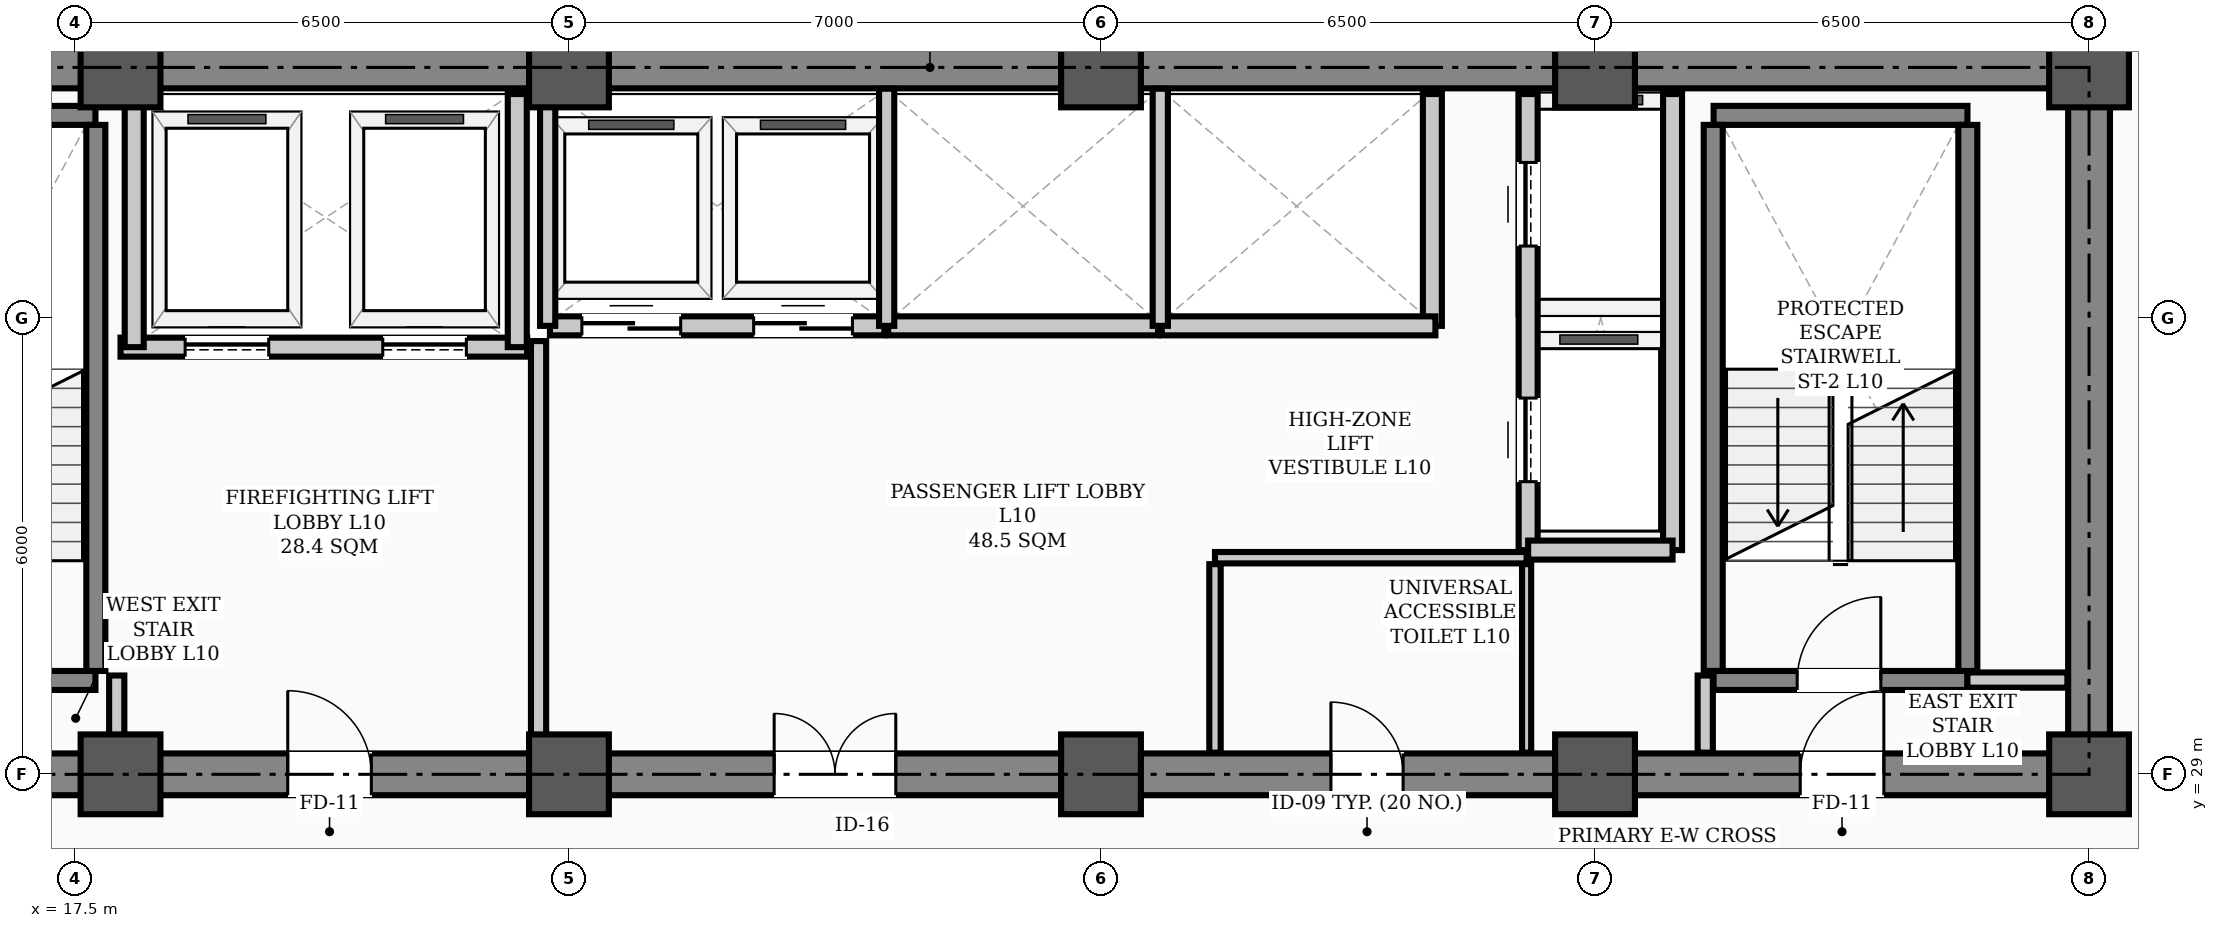
"""IFC4 building model, lengths in metres.
Left out: names, types, materials, properties, quantities, classifications, styles, units other than length and angle.
Written with IfcOpenShell. Run it as: python <this file> out.ifc"""

import sys

from ifc_helpers import new_model, si_unit, direction, frame, frame_2d, origin, origin_2d, place, context, subcontext, project, spatial, rectangle, hollow_rectangle, extrude, element, fill, save


model = new_model("IFC4")
c1 = context("Model", 3, precision=1e-05, world=origin(), true_north=direction((0.0, 1.0)))
c2 = subcontext(c1, "Body", "Model", "MODEL_VIEW")
j1 = project(units=[si_unit("LENGTHUNIT", "METRE"), si_unit("PLANEANGLEUNIT", "RADIAN")], contexts=[c1])
p1 = place(None, origin())
s1 = spatial("IfcSite", under=j1, at=p1, CompositionType="ELEMENT")
p2 = place(p1, origin())
s2 = spatial("IfcBuilding", under=s1, at=p2, CompositionType="ELEMENT")
p3 = place(p2, frame((0.0, 0.0, 42.1)))
s3 = spatial("IfcBuildingStorey", under=s2, at=p3, CompositionType="ELEMENT", Elevation=42.1)
for number, where, z_axis, x_axis in (
    (1, (18.1, 29.0, 0.0), (0.0, 0.0, 1.0), (1.0, 0.0, 0.0)),
    (2, (18.1, 38.3, 0.0), (0.0, 0.0, 1.0), (1.0, 0.0, 0.0)),
    (3, (24.0, 29.0, 0.0), (0.0, 0.0, 1.0), (1.0, 0.0, 0.0)),
    (4, (24.0, 38.3, 0.0), (0.0, 0.0, 1.0), (1.0, 0.0, 0.0)),
    (5, (31.0, 29.0, 0.0), (0.0, 0.0, 1.0), (1.0, 0.0, 0.0)),
    (6, (31.0, 38.3, 0.0), (0.0, 0.0, 1.0), (1.0, 0.0, 0.0)),
    (7, (37.5, 29.0, 0.0), (0.0, 0.0, 1.0), (1.0, 0.0, 0.0)),
    (8, (37.5, 38.3, 0.0), (0.0, 0.0, 1.0), (1.0, 0.0, 0.0)),
    (9, (44.0, 29.0, 0.0), (0.0, 0.0, 1.0), (1.0, 0.0, 0.0)),
    (10, (44.0, 38.3, 0.0), (0.0, 0.0, 1.0), (1.0, 0.0, 0.0)),
):
    element("IfcColumn", number, at=place(p3, frame(where, z_axis=z_axis, x_axis=x_axis)), inside=s3, PredefinedType="COLUMN", context=c2, shape_type="SweptSolid", body=[
        extrude(hollow_rectangle(XDim=1.05, YDim=1.05, WallThickness=0.038, InnerFilletRadius=0.019, OuterFilletRadius=0.057, at=origin_2d()), origin(), (0.0, 0.0, 1.0), 3.9),
    ])
p4 = place(p3, frame((13.5, 29.0, 0.0), z_axis=(0.0, 0.0, 1.0), x_axis=(1.0, 0.0, 0.0)))
e11 = element("IfcWall", 11, at=p4, inside=s3, PredefinedType="SHEAR", context=c2, shape_type="SweptSolid", body=[
    extrude(rectangle(XDim=30.5, YDim=0.55, at=frame_2d((15.25, 0.0))), origin(), (0.0, 0.0, 1.0), 3.72),
])
p5 = place(p4, frame((1.75, 0.0, 0.0)))
e12 = element("IfcOpeningElement", 12, at=p5, cuts=e11, PredefinedType="OPENING", context=c2, shape_type="SweptSolid", body=[
    extrude(rectangle(XDim=1.1, YDim=2.08, at=frame_2d((0.55, 1.04))), frame((0.0, 0.285, 0.0), z_axis=(0.0, -1.0, 0.0), x_axis=(1.0, 0.0, 0.0)), (0.0, 0.0, 1.0), 0.57),
])
p6 = place(p4, frame((26.7, 0.0, 0.0)))
e13 = element("IfcOpeningElement", 13, at=p6, cuts=e11, PredefinedType="OPENING", context=c2, shape_type="SweptSolid", body=[
    extrude(rectangle(XDim=1.1, YDim=2.08, at=frame_2d((0.55, 1.04))), frame((0.0, 0.285, 0.0), z_axis=(0.0, -1.0, 0.0), x_axis=(1.0, 0.0, 0.0)), (0.0, 0.0, 1.0), 0.57),
])
p7 = place(p4, frame((6.8, 0.0, 0.0)))
e14 = element("IfcOpeningElement", 14, at=p7, cuts=e11, PredefinedType="OPENING", context=c2, shape_type="SweptSolid", body=[
    extrude(rectangle(XDim=1.1, YDim=2.08, at=frame_2d((0.55, 1.04))), frame((0.0, 0.285, 0.0), z_axis=(0.0, -1.0, 0.0), x_axis=(1.0, 0.0, 0.0)), (0.0, 0.0, 1.0), 0.57),
])
p8 = place(p4, frame((13.2, 0.0, 0.0)))
e15 = element("IfcOpeningElement", 15, at=p8, cuts=e11, PredefinedType="OPENING", context=c2, shape_type="SweptSolid", body=[
    extrude(rectangle(XDim=1.6, YDim=2.08, at=frame_2d((0.8, 1.04))), frame((0.0, 0.285, 0.0), z_axis=(0.0, -1.0, 0.0), x_axis=(1.0, 0.0, 0.0)), (0.0, 0.0, 1.0), 0.57),
])
p9 = place(p4, frame((20.525, 0.0, 0.0)))
e16 = element("IfcOpeningElement", 16, at=p9, cuts=e11, PredefinedType="OPENING", context=c2, shape_type="SweptSolid", body=[
    extrude(rectangle(XDim=0.95, YDim=2.08, at=frame_2d((0.475, 1.04))), frame((0.0, 0.285, 0.0), z_axis=(0.0, -1.0, 0.0), x_axis=(1.0, 0.0, 0.0)), (0.0, 0.0, 1.0), 0.57),
])
p10 = place(p3, frame((13.5, 38.3, 0.0), z_axis=(0.0, 0.0, 1.0), x_axis=(1.0, 0.0, 0.0)))
e17 = element("IfcWall", 17, at=p10, inside=s3, PredefinedType="SHEAR", context=c2, shape_type="SweptSolid", body=[
    extrude(rectangle(XDim=30.5, YDim=0.55, at=frame_2d((15.25, 0.0))), origin(), (0.0, 0.0, 1.0), 3.72),
])
p11 = place(p3, frame((44.0, 29.35, 0.0), z_axis=(0.0, 0.0, 1.0), x_axis=(0.0, 1.0, 0.0)))
e18 = element("IfcWall", 18, at=p11, inside=s3, PredefinedType="SHEAR", context=c2, shape_type="SweptSolid", body=[
    extrude(rectangle(XDim=8.6, YDim=0.55, at=frame_2d((4.3, 0.0))), origin(), (0.0, 0.0, 1.0), 3.72),
])
p12 = place(p3, frame((14.43, 30.235, 0.0), z_axis=(0.0, 0.0, 1.0), x_axis=(1.0, 0.0, 0.0)))
e19 = element("IfcWall", 19, at=p12, inside=s3, PredefinedType="STANDARD", context=c2, shape_type="SweptSolid", body=[
    extrude(rectangle(XDim=3.34, YDim=0.25, at=frame_2d((1.67, 0.0))), origin(), (0.0, 0.0, 1.0), 3.72),
])
p13 = place(p12, frame((1.1, 0.0, 0.0)))
e20 = element("IfcOpeningElement", 20, at=p13, cuts=e19, PredefinedType="OPENING", context=c2, shape_type="SweptSolid", body=[
    extrude(rectangle(XDim=1.1, YDim=2.08, at=frame_2d((0.55, 1.04))), frame((0.0, 0.135, 0.0), z_axis=(0.0, -1.0, 0.0), x_axis=(1.0, 0.0, 0.0)), (0.0, 0.0, 1.0), 0.27),
])
p14 = place(p3, frame((14.43, 37.669, 0.0), z_axis=(0.0, 0.0, 1.0), x_axis=(1.0, 0.0, 0.0)))
e21 = element("IfcWall", 21, at=p14, inside=s3, PredefinedType="STANDARD", context=c2, shape_type="SweptSolid", body=[
    extrude(rectangle(XDim=3.34, YDim=0.25, at=frame_2d((1.67, 0.0))), origin(), (0.0, 0.0, 1.0), 3.72),
])
p15 = place(p3, frame((17.775, 30.36, 0.0), z_axis=(0.0, 0.0, 1.0), x_axis=(0.0, 1.0, 0.0)))
e22 = element("IfcWall", 22, at=p15, inside=s3, PredefinedType="STANDARD", context=c2, shape_type="SweptSolid", body=[
    extrude(rectangle(XDim=7.184, YDim=0.25, at=frame_2d((3.592, 0.0))), origin(), (0.0, 0.0, 1.0), 3.72),
])
p16 = place(p3, frame((39.06, 30.235, 0.0), z_axis=(0.0, 0.0, 1.0), x_axis=(1.0, 0.0, 0.0)))
e23 = element("IfcWall", 23, at=p16, inside=s3, PredefinedType="STANDARD", context=c2, shape_type="SweptSolid", body=[
    extrude(rectangle(XDim=3.34, YDim=0.25, at=frame_2d((1.67, 0.0))), origin(), (0.0, 0.0, 1.0), 3.72),
])
p17 = place(p16, frame((1.1, 0.0, 0.0)))
e24 = element("IfcOpeningElement", 24, at=p17, cuts=e23, PredefinedType="OPENING", context=c2, shape_type="SweptSolid", body=[
    extrude(rectangle(XDim=1.1, YDim=2.08, at=frame_2d((0.55, 1.04))), frame((0.0, 0.135, 0.0), z_axis=(0.0, -1.0, 0.0), x_axis=(1.0, 0.0, 0.0)), (0.0, 0.0, 1.0), 0.27),
])
p18 = place(p3, frame((39.06, 37.669, 0.0), z_axis=(0.0, 0.0, 1.0), x_axis=(1.0, 0.0, 0.0)))
e25 = element("IfcWall", 25, at=p18, inside=s3, PredefinedType="STANDARD", context=c2, shape_type="SweptSolid", body=[
    extrude(rectangle(XDim=3.34, YDim=0.25, at=frame_2d((1.67, 0.0))), origin(), (0.0, 0.0, 1.0), 3.72),
])
for number, where, z_axis, x_axis in (
    (26, (39.055, 30.36, 0.0), (0.0, 0.0, 1.0), (0.0, 1.0, 0.0)),
    (27, (42.405, 30.36, 0.0), (0.0, 0.0, 1.0), (0.0, 1.0, 0.0)),
):
    element("IfcWall", number, at=place(p3, frame(where, z_axis=z_axis, x_axis=x_axis)), inside=s3, PredefinedType="STANDARD", context=c2, shape_type="SweptSolid", body=[
        extrude(rectangle(XDim=7.184, YDim=0.25, at=frame_2d((3.592, 0.0))), origin(), (0.0, 0.0, 1.0), 3.72),
    ])
p19 = place(p3, frame((18.1, 34.62, 0.0), z_axis=(0.0, 0.0, 1.0), x_axis=(1.0, 0.0, 0.0)))
e28 = element("IfcWall", 28, at=p19, inside=s3, PredefinedType="STANDARD", context=c2, shape_type="SweptSolid", body=[
    extrude(rectangle(XDim=5.35, YDim=0.25, at=frame_2d((2.675, 0.0))), origin(), (0.0, 0.0, 1.0), 3.72),
])
p20 = place(p19, frame((0.85, 0.0, 0.0)))
e29 = element("IfcOpeningElement", 29, at=p20, cuts=e28, PredefinedType="OPENING", context=c2, shape_type="SweptSolid", body=[
    extrude(rectangle(XDim=1.1, YDim=2.08, at=frame_2d((0.55, 1.04))), frame((0.0, 0.135, 0.0), z_axis=(0.0, -1.0, 0.0), x_axis=(1.0, 0.0, 0.0)), (0.0, 0.0, 1.0), 0.27),
])
p21 = place(p19, frame((3.45, 0.0, 0.0)))
e30 = element("IfcOpeningElement", 30, at=p21, cuts=e28, PredefinedType="OPENING", context=c2, shape_type="SweptSolid", body=[
    extrude(rectangle(XDim=1.1, YDim=2.08, at=frame_2d((0.55, 1.04))), frame((0.0, 0.135, 0.0), z_axis=(0.0, -1.0, 0.0), x_axis=(1.0, 0.0, 0.0)), (0.0, 0.0, 1.0), 0.27),
])
p22 = place(p3, frame((36.62, 31.95, 0.0), z_axis=(0.0, 0.0, 1.0), x_axis=(0.0, 1.0, 0.0)))
e31 = element("IfcWall", 31, at=p22, inside=s3, PredefinedType="STANDARD", context=c2, shape_type="SweptSolid", body=[
    extrude(rectangle(XDim=6.0, YDim=0.25, at=frame_2d((3.0, 0.0))), origin(), (0.0, 0.0, 1.0), 3.3),
])
p23 = place(p22, frame((0.9, 0.0, 0.0)))
e32 = element("IfcOpeningElement", 32, at=p23, cuts=e31, PredefinedType="OPENING", context=c2, shape_type="SweptSolid", body=[
    extrude(rectangle(XDim=1.1, YDim=2.08, at=frame_2d((0.55, 1.04))), frame((0.0, 0.135, 0.0), z_axis=(0.0, -1.0, 0.0), x_axis=(1.0, 0.0, 0.0)), (0.0, 0.0, 1.0), 0.27),
])
p24 = place(p22, frame((4.0, 0.0, 0.0)))
e33 = element("IfcOpeningElement", 33, at=p24, cuts=e31, PredefinedType="OPENING", context=c2, shape_type="SweptSolid", body=[
    extrude(rectangle(XDim=1.1, YDim=2.08, at=frame_2d((0.55, 1.04))), frame((0.0, 0.135, 0.0), z_axis=(0.0, -1.0, 0.0), x_axis=(1.0, 0.0, 0.0)), (0.0, 0.0, 1.0), 0.27),
])
p25 = place(p3, frame((38.52, 31.95, 0.0), z_axis=(0.0, 0.0, 1.0), x_axis=(0.0, 1.0, 0.0)))
e34 = element("IfcWall", 34, at=p25, inside=s3, PredefinedType="STANDARD", context=c2, shape_type="SweptSolid", body=[
    extrude(rectangle(XDim=6.0, YDim=0.25, at=frame_2d((3.0, 0.0))), origin(), (0.0, 0.0, 1.0), 3.3),
])
p26 = place(p3, frame((36.62, 31.95, 0.0), z_axis=(0.0, 0.0, 1.0), x_axis=(1.0, 0.0, 0.0)))
e35 = element("IfcWall", 35, at=p26, inside=s3, PredefinedType="STANDARD", context=c2, shape_type="SweptSolid", body=[
    extrude(rectangle(XDim=1.9, YDim=0.25, at=frame_2d((0.95, 0.0))), origin(), (0.0, 0.0, 1.0), 3.48),
])
for number, where, z_axis, x_axis in (
    (36, (18.28, 34.62, 0.0), (0.0, 0.0, 1.0), (0.0, 1.0, 0.0)),
    (37, (23.32, 34.62, 0.0), (0.0, 0.0, 1.0), (0.0, 1.0, 0.0)),
):
    element("IfcWall", number, at=place(p3, frame(where, z_axis=z_axis, x_axis=x_axis)), inside=s3, PredefinedType="STANDARD", context=c2, shape_type="SweptSolid", body=[
        extrude(rectangle(XDim=3.33, YDim=0.25, at=frame_2d((1.665, 0.0))), origin(), (0.0, 0.0, 1.0), 3.3),
    ])
p27 = place(p3, frame((35.36, 34.9, 0.0), z_axis=(0.0, 0.0, 1.0), x_axis=(0.0, 1.0, 0.0)))
e38 = element("IfcWall", 38, at=p27, inside=s3, PredefinedType="STANDARD", context=c2, shape_type="SweptSolid", body=[
    extrude(rectangle(XDim=3.05, YDim=0.25, at=frame_2d((1.525, 0.0))), origin(), (0.0, 0.0, 1.0), 3.3),
])
p28 = place(p3, frame((23.75, 34.9, 0.0), z_axis=(0.0, 0.0, 1.0), x_axis=(1.0, 0.0, 0.0)))
e39 = element("IfcWall", 39, at=p28, inside=s3, PredefinedType="STANDARD", context=c2, shape_type="SweptSolid", body=[
    extrude(rectangle(XDim=4.4, YDim=0.25, at=frame_2d((2.2, 0.0))), origin(), (0.0, 0.0, 1.0), 3.72),
])
p29 = place(p28, frame((0.42, 0.0, 0.0)))
e40 = element("IfcOpeningElement", 40, at=p29, cuts=e39, PredefinedType="OPENING", context=c2, shape_type="SweptSolid", body=[
    extrude(rectangle(XDim=1.3, YDim=2.08, at=frame_2d((0.65, 1.04))), frame((0.0, 0.135, 0.0), z_axis=(0.0, -1.0, 0.0), x_axis=(1.0, 0.0, 0.0)), (0.0, 0.0, 1.0), 0.27),
])
p30 = place(p28, frame((2.68, 0.0, 0.0)))
e41 = element("IfcOpeningElement", 41, at=p30, cuts=e39, PredefinedType="OPENING", context=c2, shape_type="SweptSolid", body=[
    extrude(rectangle(XDim=1.3, YDim=2.08, at=frame_2d((0.65, 1.04))), frame((0.0, 0.135, 0.0), z_axis=(0.0, -1.0, 0.0), x_axis=(1.0, 0.0, 0.0)), (0.0, 0.0, 1.0), 0.27),
])
p31 = place(p3, frame((28.2, 34.9, 0.0), z_axis=(0.0, 0.0, 1.0), x_axis=(1.0, 0.0, 0.0)))
e42 = element("IfcWall", 42, at=p31, inside=s3, PredefinedType="STANDARD", context=c2, shape_type="SweptSolid", body=[
    extrude(rectangle(XDim=3.55, YDim=0.25, at=frame_2d((1.775, 0.0))), origin(), (0.0, 0.0, 1.0), 3.72),
])
p32 = place(p3, frame((31.8, 34.9, 0.0), z_axis=(0.0, 0.0, 1.0), x_axis=(1.0, 0.0, 0.0)))
e43 = element("IfcWall", 43, at=p32, inside=s3, PredefinedType="STANDARD", context=c2, shape_type="SweptSolid", body=[
    extrude(rectangle(XDim=3.6, YDim=0.25, at=frame_2d((1.8, 0.0))), origin(), (0.0, 0.0, 1.0), 3.72),
])
p33 = place(p3, frame((42.4, 30.24, 0.0), z_axis=(0.0, 0.0, 1.0), x_axis=(1.0, 0.0, 0.0)))
e44 = element("IfcWall", 44, at=p33, inside=s3, PredefinedType="STANDARD", context=c2, shape_type="SweptSolid", body=[
    extrude(rectangle(XDim=1.315, YDim=0.2, at=frame_2d((0.658, 0.0))), origin(), (0.0, 0.0, 1.0), 3.1),
])
p34 = place(p3, frame((32.5, 31.85, 0.0), z_axis=(0.0, 0.0, 1.0), x_axis=(1.0, 0.0, 0.0)))
e45 = element("IfcWall", 45, at=p34, inside=s3, PredefinedType="PARTITIONING", context=c2, shape_type="SweptSolid", body=[
    extrude(rectangle(XDim=4.1, YDim=0.15, at=frame_2d((2.05, 0.0))), origin(), (0.0, 0.0, 1.0), 3.72),
])
for number, where, z_axis, x_axis in (
    (46, (18.05, 29.285, 0.0), (0.0, 0.0, 1.0), (0.0, 1.0, 0.0)),
    (47, (38.95, 29.285, 0.0), (0.0, 0.0, 1.0), (0.0, 1.0, 0.0)),
):
    element("IfcWall", number, at=place(p3, frame(where, z_axis=z_axis, x_axis=x_axis)), inside=s3, PredefinedType="STANDARD", context=c2, shape_type="SweptSolid", body=[
        extrude(rectangle(XDim=1.015, YDim=0.2, at=frame_2d((0.508, 0.0))), origin(), (0.0, 0.0, 1.0), 3.3),
    ])
p35 = place(p3, frame((23.6, 29.285, 0.0), z_axis=(0.0, 0.0, 1.0), x_axis=(0.0, 1.0, 0.0)))
e48 = element("IfcWall", 48, at=p35, inside=s3, PredefinedType="STANDARD", context=c2, shape_type="SweptSolid", body=[
    extrude(rectangle(XDim=5.415, YDim=0.2, at=frame_2d((2.708, 0.0))), origin(), (0.0, 0.0, 1.0), 3.1),
])
p36 = place(p3, frame((32.5, 29.285, 0.0), z_axis=(0.0, 0.0, 1.0), x_axis=(0.0, 1.0, 0.0)))
e49 = element("IfcWall", 49, at=p36, inside=s3, PredefinedType="PARTITIONING", context=c2, shape_type="SweptSolid", body=[
    extrude(rectangle(XDim=2.48, YDim=0.15, at=frame_2d((1.24, 0.0))), origin(), (0.0, 0.0, 1.0), 3.3),
])
p37 = place(p3, frame((36.6, 29.285, 0.0), z_axis=(0.0, 0.0, 1.0), x_axis=(0.0, 1.0, 0.0)))
e50 = element("IfcWall", 50, at=p37, inside=s3, PredefinedType="PARTITIONING", context=c2, shape_type="SweptSolid", body=[
    extrude(rectangle(XDim=2.48, YDim=0.12, at=frame_2d((1.24, 0.0))), origin(), (0.0, 0.0, 1.0), 3.3),
])
p38 = place(p3, frame((23.72, 34.9, 0.0), z_axis=(0.0, 0.0, 1.0), x_axis=(0.0, 1.0, 0.0)))
e51 = element("IfcWall", 51, at=p38, inside=s3, PredefinedType="STANDARD", context=c2, shape_type="SweptSolid", body=[
    extrude(rectangle(XDim=3.12, YDim=0.2, at=frame_2d((1.56, 0.0))), origin(), (0.0, 0.0, 1.0), 3.1),
])
for number, where, z_axis, x_axis in (
    (52, (28.18, 34.9, 0.0), (0.0, 0.0, 1.0), (0.0, 1.0, 0.0)),
    (53, (31.78, 34.9, 0.0), (0.0, 0.0, 1.0), (0.0, 1.0, 0.0)),
):
    element("IfcWall", number, at=place(p3, frame(where, z_axis=z_axis, x_axis=x_axis)), inside=s3, PredefinedType="STANDARD", context=c2, shape_type="SweptSolid", body=[
        extrude(rectangle(XDim=3.12, YDim=0.2, at=frame_2d((1.56, 0.0))), origin(), (0.0, 0.0, 1.0), 3.3),
    ])
p39 = place(p17, origin())
e54 = element("IfcDoor", 54, at=p39, inside=s3, OperationType="SINGLE_SWING_RIGHT", PredefinedType="DOOR", context=c2, shape_type="SweptSolid", body=[
    extrude(rectangle(XDim=1.1, YDim=2.08, at=frame_2d((0.55, 1.04))), frame((0.0, 0.025, 0.0), z_axis=(0.0, -1.0, 0.0), x_axis=(1.0, 0.0, 0.0)), (0.0, 0.0, 1.0), 0.05),
])
fill(e24, e54)
p40 = place(p6, origin())
e55 = element("IfcDoor", 55, at=p40, inside=s3, OperationType="SINGLE_SWING_RIGHT", PredefinedType="DOOR", context=c2, shape_type="SweptSolid", body=[
    extrude(rectangle(XDim=1.1, YDim=2.08, at=frame_2d((0.55, 1.04))), frame((0.0, 0.025, 0.0), z_axis=(0.0, -1.0, 0.0), x_axis=(1.0, 0.0, 0.0)), (0.0, 0.0, 1.0), 0.05),
])
fill(e13, e55)
p41 = place(p7, origin())
e56 = element("IfcDoor", 56, at=p41, inside=s3, OperationType="SINGLE_SWING_LEFT", PredefinedType="DOOR", context=c2, shape_type="SweptSolid", body=[
    extrude(rectangle(XDim=1.1, YDim=2.08, at=frame_2d((0.55, 1.04))), frame((0.0, 0.025, 0.0), z_axis=(0.0, -1.0, 0.0), x_axis=(1.0, 0.0, 0.0)), (0.0, 0.0, 1.0), 0.05),
])
fill(e14, e56)
p42 = place(p8, origin())
e57 = element("IfcDoor", 57, at=p42, inside=s3, OperationType="DOUBLE_DOOR_SINGLE_SWING", PredefinedType="DOOR", context=c2, shape_type="SweptSolid", body=[
    extrude(rectangle(XDim=1.6, YDim=2.08, at=frame_2d((0.8, 1.04))), frame((0.0, 0.025, 0.0), z_axis=(0.0, -1.0, 0.0), x_axis=(1.0, 0.0, 0.0)), (0.0, 0.0, 1.0), 0.05),
])
fill(e15, e57)
p43 = place(p9, origin())
e58 = element("IfcDoor", 58, at=p43, inside=s3, OperationType="SINGLE_SWING_LEFT", PredefinedType="DOOR", context=c2, shape_type="SweptSolid", body=[
    extrude(rectangle(XDim=0.95, YDim=2.08, at=frame_2d((0.475, 1.04))), frame((0.0, 0.025, 0.0), z_axis=(0.0, -1.0, 0.0), x_axis=(1.0, 0.0, 0.0)), (0.0, 0.0, 1.0), 0.05),
])
fill(e16, e58)
p44 = place(p20, origin())
e59 = element("IfcDoor", 59, at=p44, inside=s3, OperationType="SLIDING_TO_LEFT", PredefinedType="DOOR", context=c2, shape_type="SweptSolid", body=[
    extrude(rectangle(XDim=1.1, YDim=2.08, at=frame_2d((0.55, 1.04))), frame((0.0, 0.025, 0.0), z_axis=(0.0, -1.0, 0.0), x_axis=(1.0, 0.0, 0.0)), (0.0, 0.0, 1.0), 0.05),
])
fill(e29, e59)
p45 = place(p21, origin())
e60 = element("IfcDoor", 60, at=p45, inside=s3, OperationType="SLIDING_TO_LEFT", PredefinedType="DOOR", context=c2, shape_type="SweptSolid", body=[
    extrude(rectangle(XDim=1.1, YDim=2.08, at=frame_2d((0.55, 1.04))), frame((0.0, 0.025, 0.0), z_axis=(0.0, -1.0, 0.0), x_axis=(1.0, 0.0, 0.0)), (0.0, 0.0, 1.0), 0.05),
])
fill(e30, e60)
p46 = place(p23, origin())
e61 = element("IfcDoor", 61, at=p46, inside=s3, OperationType="SLIDING_TO_LEFT", PredefinedType="DOOR", context=c2, shape_type="SweptSolid", body=[
    extrude(rectangle(XDim=1.1, YDim=2.08, at=frame_2d((0.55, 1.04))), frame((0.0, 0.025, 0.0), z_axis=(0.0, -1.0, 0.0), x_axis=(1.0, 0.0, 0.0)), (0.0, 0.0, 1.0), 0.05),
])
fill(e32, e61)
p47 = place(p24, origin())
e62 = element("IfcDoor", 62, at=p47, inside=s3, OperationType="SLIDING_TO_LEFT", PredefinedType="DOOR", context=c2, shape_type="SweptSolid", body=[
    extrude(rectangle(XDim=1.1, YDim=2.08, at=frame_2d((0.55, 1.04))), frame((0.0, 0.025, 0.0), z_axis=(0.0, -1.0, 0.0), x_axis=(1.0, 0.0, 0.0)), (0.0, 0.0, 1.0), 0.05),
])
fill(e33, e62)
p48 = place(p29, origin())
e63 = element("IfcDoor", 63, at=p48, inside=s3, OperationType="DOUBLE_DOOR_SLIDING", PredefinedType="DOOR", context=c2, shape_type="SweptSolid", body=[
    extrude(rectangle(XDim=1.3, YDim=2.08, at=frame_2d((0.65, 1.04))), frame((0.0, 0.025, 0.0), z_axis=(0.0, -1.0, 0.0), x_axis=(1.0, 0.0, 0.0)), (0.0, 0.0, 1.0), 0.05),
])
fill(e40, e63)
p49 = place(p30, origin())
e64 = element("IfcDoor", 64, at=p49, inside=s3, OperationType="DOUBLE_DOOR_SLIDING", PredefinedType="DOOR", context=c2, shape_type="SweptSolid", body=[
    extrude(rectangle(XDim=1.3, YDim=2.08, at=frame_2d((0.65, 1.04))), frame((0.0, 0.025, 0.0), z_axis=(0.0, -1.0, 0.0), x_axis=(1.0, 0.0, 0.0)), (0.0, 0.0, 1.0), 0.05),
])
fill(e41, e64)
save(model, sys.argv[1])
